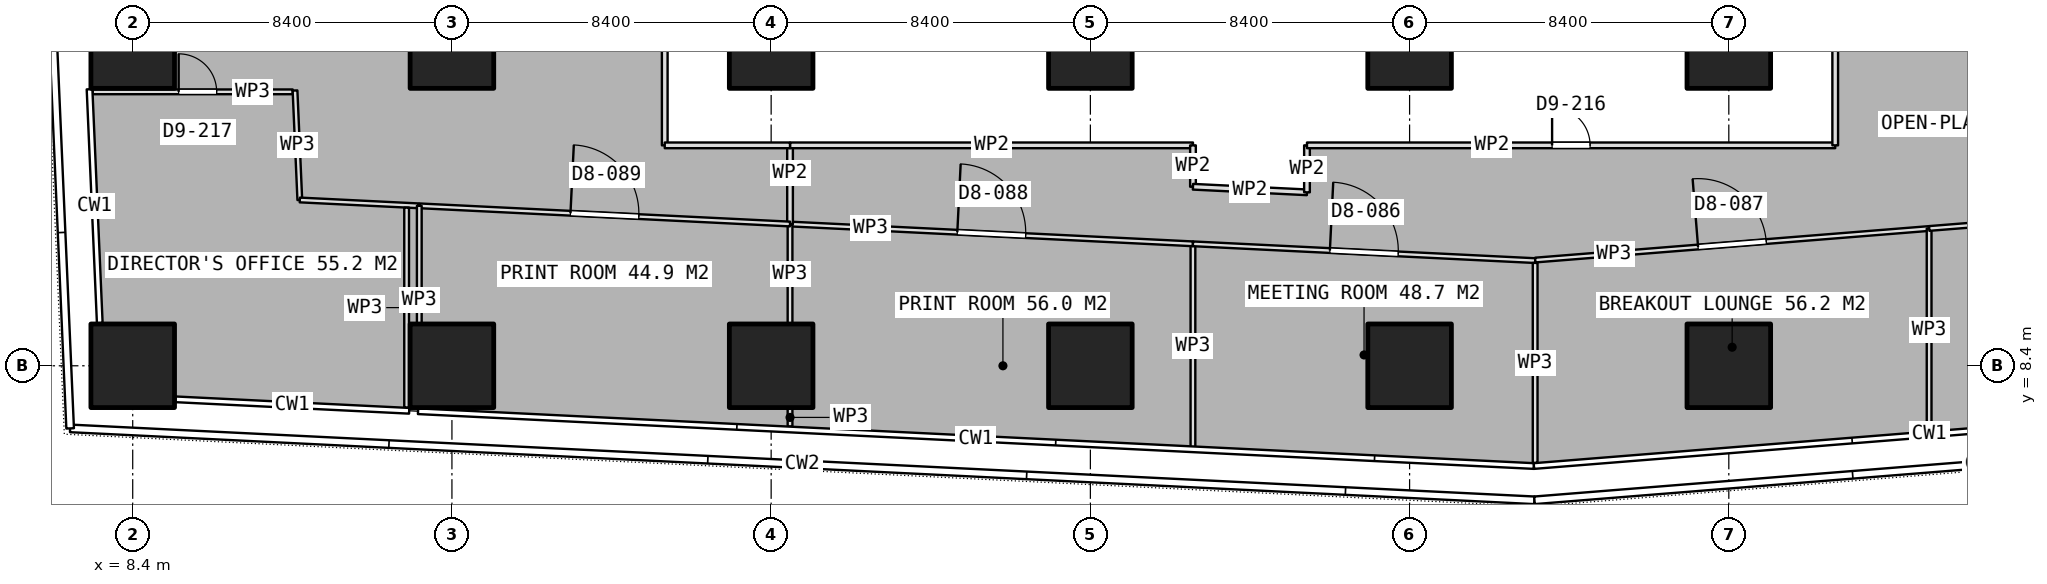
"""IFC4 building model, lengths in metres.
Left out: names, types, materials, properties, quantities, classifications, styles, units other than length and angle.
Written with IfcOpenShell. Run it as: python <this file> out.ifc"""

import sys

from ifc_helpers import new_model, si_unit, direction, frame, frame_2d, origin, origin_2d, place, context, subcontext, project, spatial, rectangle, extrude, element, fill, save


model = new_model("IFC4")
c1 = context("Model", 3, precision=1e-05, world=origin(), true_north=direction((0.0, 1.0)))
c2 = subcontext(c1, "Body", "Model", "MODEL_VIEW")
j1 = project(units=[si_unit("LENGTHUNIT", "METRE"), si_unit("PLANEANGLEUNIT", "RADIAN")], contexts=[c1])
p1 = place(None, origin())
s1 = spatial("IfcSite", under=j1, at=p1, CompositionType="ELEMENT")
p2 = place(p1, origin())
s2 = spatial("IfcBuilding", under=s1, at=p2, CompositionType="ELEMENT")
p3 = place(p2, frame((0.0, 0.0, 66.65)))
s3 = spatial("IfcBuildingStorey", under=s2, at=p3, CompositionType="ELEMENT", Elevation=66.65)
for number, where, z_axis, x_axis in (
    (1, (8.4, 8.4, 0.0), (0.0, 0.0, 1.0), (1.0, 0.0, 0.0)),
    (2, (8.4, 16.8, 0.0), (0.0, 0.0, 1.0), (1.0, 0.0, 0.0)),
    (3, (16.8, 8.4, 0.0), (0.0, 0.0, 1.0), (1.0, 0.0, 0.0)),
    (4, (16.8, 16.8, 0.0), (0.0, 0.0, 1.0), (1.0, 0.0, 0.0)),
    (5, (25.2, 8.4, 0.0), (0.0, 0.0, 1.0), (1.0, 0.0, 0.0)),
    (6, (25.2, 16.8, 0.0), (0.0, 0.0, 1.0), (1.0, 0.0, 0.0)),
    (7, (33.6, 8.4, 0.0), (0.0, 0.0, 1.0), (1.0, 0.0, 0.0)),
    (8, (33.6, 16.8, 0.0), (0.0, 0.0, 1.0), (1.0, 0.0, 0.0)),
    (9, (42.0, 8.4, 0.0), (0.0, 0.0, 1.0), (1.0, 0.0, 0.0)),
    (10, (42.0, 16.8, 0.0), (0.0, 0.0, 1.0), (1.0, 0.0, 0.0)),
    (11, (50.4, 8.4, 0.0), (0.0, 0.0, 1.0), (1.0, 0.0, 0.0)),
    (12, (50.4, 16.8, 0.0), (0.0, 0.0, 1.0), (1.0, 0.0, 0.0)),
):
    element("IfcColumn", number, at=place(p3, frame(where, z_axis=z_axis, x_axis=x_axis)), inside=s3, PredefinedType="COLUMN", context=c2, shape_type="SweptSolid", body=[
        extrude(rectangle(XDim=2.2, YDim=2.2, at=origin_2d()), origin(), (0.0, 0.0, 1.0), 3.75),
    ])
p4 = place(p3, frame((36.299, 6.253, 0.0), z_axis=(0.0, 0.0, 1.0), x_axis=(0.0, 1.0, 0.0)))
e13 = element("IfcWall", 13, at=p4, inside=s3, PredefinedType="PARTITIONING", context=c2, shape_type="SweptSolid", body=[
    extrude(rectangle(XDim=5.356, YDim=0.125, at=frame_2d((2.678, 0.0))), origin(), (0.0, 0.0, 1.0), 3.5),
])
p5 = place(p3, frame((36.299, 11.609, 0.0), z_axis=(0.0, 0.0, 1.0), x_axis=(0.998798622269, -0.049003185143, 0.0)))
e14 = element("IfcWall", 14, at=p5, inside=s3, PredefinedType="PARTITIONING", context=c2, shape_type="SweptSolid", body=[
    extrude(rectangle(XDim=9.018, YDim=0.125, at=frame_2d((4.509, 0.0))), origin(), (0.0, 0.0, 1.0), 3.5),
])
p6 = place(p5, frame((3.608, 0.0, 0.0)))
e15 = element("IfcOpeningElement", 15, at=p6, cuts=e14, PredefinedType="OPENING", context=c2, shape_type="SweptSolid", body=[
    extrude(rectangle(XDim=1.8, YDim=2.1, at=frame_2d((0.9, 1.05))), frame((0.0, 0.073, 0.0), z_axis=(0.0, -1.0, 0.0), x_axis=(1.0, 0.0, 0.0)), (0.0, 0.0, 1.0), 0.145),
])
p7 = place(p3, frame((45.304, 11.107, 0.0), z_axis=(0.0, 0.0, 1.0), x_axis=(0.0, -1.0, 0.0)))
e16 = element("IfcWall", 16, at=p7, inside=s3, PredefinedType="PARTITIONING", context=c2, shape_type="SweptSolid", body=[
    extrude(rectangle(XDim=5.262, YDim=0.125, at=frame_2d((2.631, 0.0))), origin(), (0.0, 0.0, 1.0), 3.5),
])
p8 = place(p3, frame((45.307, 11.182, 0.0), z_axis=(0.0, 0.0, 1.0), x_axis=(0.996807957409, 0.079836683593, 0.0)))
e17 = element("IfcWall", 17, at=p8, inside=s3, PredefinedType="PARTITIONING", context=c2, shape_type="SweptSolid", body=[
    extrude(rectangle(XDim=10.397, YDim=0.125, at=frame_2d((5.199, 0.0))), origin(), (0.0, 0.0, 1.0), 3.5),
])
p9 = place(p8, frame((4.298, 0.0, 0.0)))
e18 = element("IfcOpeningElement", 18, at=p9, cuts=e17, PredefinedType="OPENING", context=c2, shape_type="SweptSolid", body=[
    extrude(rectangle(XDim=1.8, YDim=2.1, at=frame_2d((0.9, 1.05))), frame((0.0, 0.073, 0.0), z_axis=(0.0, -1.0, 0.0), x_axis=(1.0, 0.0, 0.0)), (0.0, 0.0, 1.0), 0.145),
])
p10 = place(p3, frame((55.671, 12.012, 0.0), z_axis=(0.0, 0.0, 1.0), x_axis=(0.0, -1.0, 0.0)))
e19 = element("IfcWall", 19, at=p10, inside=s3, PredefinedType="PARTITIONING", context=c2, shape_type="SweptSolid", body=[
    extrude(rectangle(XDim=5.337, YDim=0.125, at=frame_2d((2.668, 0.0))), origin(), (0.0, 0.0, 1.0), 3.5),
])
p11 = place(p3, frame((55.673, 12.013, 0.0), z_axis=(0.0, 0.0, 1.0), x_axis=(0.996811579084, 0.079791451955, 0.0)))
e20 = element("IfcWall", 20, at=p11, inside=s3, PredefinedType="PARTITIONING", context=c2, shape_type="SweptSolid", body=[
    extrude(rectangle(XDim=7.346, YDim=0.125, at=frame_2d((3.673, 0.0))), origin(), (0.0, 0.0, 1.0), 3.5),
])
p12 = place(p11, frame((3.173, 0.0, 0.0)))
e21 = element("IfcOpeningElement", 21, at=p12, cuts=e20, PredefinedType="OPENING", context=c2, shape_type="SweptSolid", body=[
    extrude(rectangle(XDim=1.0, YDim=2.1, at=frame_2d((0.5, 1.05))), frame((0.0, 0.073, 0.0), z_axis=(0.0, -1.0, 0.0), x_axis=(1.0, 0.0, 0.0)), (0.0, 0.0, 1.0), 0.145),
])
p13 = place(p3, frame((25.697, 12.13, 0.0), z_axis=(0.0, 0.0, 1.0), x_axis=(0.99879453849, -0.049086351277, 0.0)))
e22 = element("IfcWall", 22, at=p13, inside=s3, PredefinedType="PARTITIONING", context=c2, shape_type="SweptSolid", body=[
    extrude(rectangle(XDim=10.614, YDim=0.125, at=frame_2d((5.307, 0.0))), origin(), (0.0, 0.0, 1.0), 3.5),
])
p14 = place(p13, frame((4.407, 0.0, 0.0)))
e23 = element("IfcOpeningElement", 23, at=p14, cuts=e22, PredefinedType="OPENING", context=c2, shape_type="SweptSolid", body=[
    extrude(rectangle(XDim=1.8, YDim=2.1, at=frame_2d((0.9, 1.05))), frame((0.0, 0.073, 0.0), z_axis=(0.0, -1.0, 0.0), x_axis=(1.0, 0.0, 0.0)), (0.0, 0.0, 1.0), 0.145),
])
p15 = place(p3, frame((25.697, 6.803, 0.0), z_axis=(0.0, 0.0, 1.0), x_axis=(0.0, 1.0, 0.0)))
e24 = element("IfcWall", 24, at=p15, inside=s3, PredefinedType="PARTITIONING", context=c2, shape_type="SweptSolid", body=[
    extrude(rectangle(XDim=0.477, YDim=0.125, at=frame_2d((0.239, 0.0))), origin(), (0.0, 0.0, 1.0), 3.5),
])
p16 = place(p3, frame((25.697, 9.52, 0.0), z_axis=(0.0, 0.0, 1.0), x_axis=(0.0, 1.0, 0.0)))
e25 = element("IfcWall", 25, at=p16, inside=s3, PredefinedType="PARTITIONING", context=c2, shape_type="SweptSolid", body=[
    extrude(rectangle(XDim=2.61, YDim=0.125, at=frame_2d((1.305, 0.0))), origin(), (0.0, 0.0, 1.0), 3.5),
])
p17 = place(p3, frame((25.697, 12.13, 0.0), z_axis=(0.0, 0.0, 1.0), x_axis=(0.0, 1.0, 0.0)))
e26 = element("IfcWall", 26, at=p17, inside=s3, PredefinedType="PARTITIONING", context=c2, shape_type="SweptSolid", body=[
    extrude(rectangle(XDim=2.07, YDim=0.15, at=frame_2d((1.035, 0.0))), origin(), (0.0, 0.0, 1.0), 3.5),
])
p18 = place(p3, frame((25.697, 14.2, 0.0), z_axis=(0.0, 0.0, 1.0), x_axis=(1.0, 0.0, 0.0)))
e27 = element("IfcWall", 27, at=p18, inside=s3, PredefinedType="PARTITIONING", context=c2, shape_type="SweptSolid", body=[
    extrude(rectangle(XDim=10.603, YDim=0.15, at=frame_2d((5.302, 0.0))), origin(), (0.0, 0.0, 1.0), 3.5),
])
p19 = place(p3, frame((36.3, 14.2, 0.0), z_axis=(0.0, 0.0, 1.0), x_axis=(0.0, -1.0, 0.0)))
e28 = element("IfcWall", 28, at=p19, inside=s3, PredefinedType="PARTITIONING", context=c2, shape_type="SweptSolid", body=[
    extrude(rectangle(XDim=1.089, YDim=0.15, at=frame_2d((0.544, 0.0))), origin(), (0.0, 0.0, 1.0), 3.5),
])
p20 = place(p3, frame((36.3, 13.111, 0.0), z_axis=(0.0, 0.0, 1.0), x_axis=(0.998802102454, -0.048932199355, 0.0)))
e29 = element("IfcWall", 29, at=p20, inside=s3, PredefinedType="PARTITIONING", context=c2, shape_type="SweptSolid", body=[
    extrude(rectangle(XDim=3.004, YDim=0.15, at=frame_2d((1.502, 0.0))), origin(), (0.0, 0.0, 1.0), 3.5),
])
p21 = place(p3, frame((39.3, 12.964, 0.0), z_axis=(0.0, 0.0, 1.0), x_axis=(0.0, 1.0, 0.0)))
e30 = element("IfcWall", 30, at=p21, inside=s3, PredefinedType="PARTITIONING", context=c2, shape_type="SweptSolid", body=[
    extrude(rectangle(XDim=1.236, YDim=0.15, at=frame_2d((0.618, 0.0))), origin(), (0.0, 0.0, 1.0), 3.5),
])
p22 = place(p3, frame((39.3, 14.2, 0.0), z_axis=(0.0, 0.0, 1.0), x_axis=(1.0, 0.0, 0.0)))
e31 = element("IfcWall", 31, at=p22, inside=s3, PredefinedType="PARTITIONING", context=c2, shape_type="SweptSolid", body=[
    extrude(rectangle(XDim=13.9, YDim=0.15, at=frame_2d((6.95, 0.0))), origin(), (0.0, 0.0, 1.0), 3.5),
])
p23 = place(p22, frame((6.45, 0.0, 0.0)))
e32 = element("IfcOpeningElement", 32, at=p23, cuts=e31, PredefinedType="OPENING", context=c2, shape_type="SweptSolid", body=[
    extrude(rectangle(XDim=1.0, YDim=2.1, at=frame_2d((0.5, 1.05))), frame((0.0, 0.085, 0.0), z_axis=(0.0, -1.0, 0.0), x_axis=(1.0, 0.0, 0.0)), (0.0, 0.0, 1.0), 0.17),
])
p24 = place(p3, frame((53.2, 14.2, 0.0), z_axis=(0.0, 0.0, 1.0), x_axis=(0.0, 1.0, 0.0)))
e33 = element("IfcWall", 33, at=p24, inside=s3, PredefinedType="PARTITIONING", context=c2, shape_type="SweptSolid", body=[
    extrude(rectangle(XDim=11.352, YDim=0.15, at=frame_2d((5.676, 0.0))), origin(), (0.0, 0.0, 1.0), 3.5),
])
p25 = place(p3, frame((7.347, 15.608, 0.0), z_axis=(0.0, 0.0, 1.0), x_axis=(1.0, 0.0, 0.0)))
e34 = element("IfcWall", 34, at=p25, inside=s3, PredefinedType="PARTITIONING", context=c2, shape_type="SweptSolid", body=[
    extrude(rectangle(XDim=5.263, YDim=0.125, at=frame_2d((2.632, 0.0))), origin(), (0.0, 0.0, 1.0), 3.5),
])
p26 = place(p25, frame((2.262, 0.0, 0.0)))
e35 = element("IfcOpeningElement", 35, at=p26, cuts=e34, PredefinedType="OPENING", context=c2, shape_type="SweptSolid", body=[
    extrude(rectangle(XDim=1.0, YDim=2.1, at=frame_2d((0.5, 1.05))), frame((0.0, 0.073, 0.0), z_axis=(0.0, -1.0, 0.0), x_axis=(1.0, 0.0, 0.0)), (0.0, 0.0, 1.0), 0.145),
])
p27 = place(p3, frame((12.671, 15.643, 0.0), z_axis=(0.0, 0.0, 1.0), x_axis=(0.043782676762, -0.999041078843, 0.0)))
e36 = element("IfcWall", 36, at=p27, inside=s3, PredefinedType="PARTITIONING", context=c2, shape_type="SweptSolid", body=[
    extrude(rectangle(XDim=2.883, YDim=0.125, at=frame_2d((1.441, 0.0))), origin(), (0.0, 0.0, 1.0), 3.5),
])
p28 = place(p3, frame((12.797, 12.763, 0.0), z_axis=(0.0, 0.0, 1.0), x_axis=(0.998790140287, -0.049175762993, 0.0)))
e37 = element("IfcWall", 37, at=p28, inside=s3, PredefinedType="PARTITIONING", context=c2, shape_type="SweptSolid", body=[
    extrude(rectangle(XDim=3.133, YDim=0.125, at=frame_2d((1.566, 0.0))), origin(), (0.0, 0.0, 1.0), 3.5),
])
p29 = place(p3, frame((15.608, 12.562, 0.0), z_axis=(0.0, 0.0, 1.0), x_axis=(0.0, -1.0, 0.0)))
e38 = element("IfcWall", 38, at=p29, inside=s3, PredefinedType="PARTITIONING", context=c2, shape_type="SweptSolid", body=[
    extrude(rectangle(XDim=5.263, YDim=0.125, at=frame_2d((2.631, 0.0))), origin(), (0.0, 0.0, 1.0), 3.5),
])
p30 = place(p3, frame((15.941, 12.609, 0.0), z_axis=(0.0, 0.0, 1.0), x_axis=(0.998796633854, -0.049043696865, 0.0)))
e39 = element("IfcWall", 39, at=p30, inside=s3, PredefinedType="PARTITIONING", context=c2, shape_type="SweptSolid", body=[
    extrude(rectangle(XDim=9.767, YDim=0.125, at=frame_2d((4.883, 0.0))), origin(), (0.0, 0.0, 1.0), 3.5),
])
p31 = place(p30, frame((3.983, 0.0, 0.0)))
e40 = element("IfcOpeningElement", 40, at=p31, cuts=e39, PredefinedType="OPENING", context=c2, shape_type="SweptSolid", body=[
    extrude(rectangle(XDim=1.8, YDim=2.1, at=frame_2d((0.9, 1.05))), frame((0.0, 0.073, 0.0), z_axis=(0.0, -1.0, 0.0), x_axis=(1.0, 0.0, 0.0)), (0.0, 0.0, 1.0), 0.145),
])
p32 = place(p3, frame((15.941, 9.52, 0.0), z_axis=(0.0, 0.0, 1.0), x_axis=(0.0, 1.0, 0.0)))
e41 = element("IfcWall", 41, at=p32, inside=s3, PredefinedType="PARTITIONING", context=c2, shape_type="SweptSolid", body=[
    extrude(rectangle(XDim=3.089, YDim=0.125, at=frame_2d((1.544, 0.0))), origin(), (0.0, 0.0, 1.0), 3.5),
])
p33 = place(p3, frame((22.4, 28.2, 0.0), z_axis=(0.0, 0.0, 1.0), x_axis=(0.0, -1.0, 0.0)))
e42 = element("IfcWall", 42, at=p33, inside=s3, PredefinedType="PARTITIONING", context=c2, shape_type="SweptSolid", body=[
    extrude(rectangle(XDim=14.0, YDim=0.15, at=frame_2d((7.0, 0.0))), origin(), (0.0, 0.0, 1.0), 3.5),
])
p34 = place(p3, frame((22.4, 14.2, 0.0), z_axis=(0.0, 0.0, 1.0), x_axis=(1.0, 0.0, 0.0)))
e43 = element("IfcWall", 43, at=p34, inside=s3, PredefinedType="PARTITIONING", context=c2, shape_type="SweptSolid", body=[
    extrude(rectangle(XDim=3.296, YDim=0.15, at=frame_2d((1.648, 0.0))), origin(), (0.0, 0.0, 1.0), 3.5),
])
p35 = place(p6, origin())
e44 = element("IfcDoor", 44, at=p35, inside=s3, OperationType="DOUBLE_DOOR_SINGLE_SWING", PredefinedType="DOOR", context=c2, shape_type="SweptSolid", body=[
    extrude(rectangle(XDim=1.8, YDim=2.1, at=frame_2d((0.9, 1.05))), frame((0.0, 0.025, 0.0), z_axis=(0.0, -1.0, 0.0), x_axis=(1.0, 0.0, 0.0)), (0.0, 0.0, 1.0), 0.05),
])
fill(e15, e44)
p36 = place(p9, origin())
e45 = element("IfcDoor", 45, at=p36, inside=s3, OperationType="DOUBLE_DOOR_SINGLE_SWING", PredefinedType="DOOR", context=c2, shape_type="SweptSolid", body=[
    extrude(rectangle(XDim=1.8, YDim=2.1, at=frame_2d((0.9, 1.05))), frame((0.0, 0.025, 0.0), z_axis=(0.0, -1.0, 0.0), x_axis=(1.0, 0.0, 0.0)), (0.0, 0.0, 1.0), 0.05),
])
fill(e18, e45)
p37 = place(p14, origin())
e46 = element("IfcDoor", 46, at=p37, inside=s3, OperationType="DOUBLE_DOOR_SINGLE_SWING", PredefinedType="DOOR", context=c2, shape_type="SweptSolid", body=[
    extrude(rectangle(XDim=1.8, YDim=2.1, at=frame_2d((0.9, 1.05))), frame((0.0, 0.025, 0.0), z_axis=(0.0, -1.0, 0.0), x_axis=(1.0, 0.0, 0.0)), (0.0, 0.0, 1.0), 0.05),
])
fill(e23, e46)
p38 = place(p23, origin())
e47 = element("IfcDoor", 47, at=p38, inside=s3, OperationType="SINGLE_SWING_LEFT", PredefinedType="DOOR", context=c2, shape_type="SweptSolid", body=[
    extrude(rectangle(XDim=1.0, YDim=2.1, at=frame_2d((0.5, 1.05))), frame((0.0, 0.025, 0.0), z_axis=(0.0, -1.0, 0.0), x_axis=(1.0, 0.0, 0.0)), (0.0, 0.0, 1.0), 0.05),
])
fill(e32, e47)
p39 = place(p26, origin())
e48 = element("IfcDoor", 48, at=p39, inside=s3, OperationType="SINGLE_SWING_LEFT", PredefinedType="DOOR", context=c2, shape_type="SweptSolid", body=[
    extrude(rectangle(XDim=1.0, YDim=2.1, at=frame_2d((0.5, 1.05))), frame((0.0, 0.025, 0.0), z_axis=(0.0, -1.0, 0.0), x_axis=(1.0, 0.0, 0.0)), (0.0, 0.0, 1.0), 0.05),
])
fill(e35, e48)
p40 = place(p31, origin())
e49 = element("IfcDoor", 49, at=p40, inside=s3, OperationType="DOUBLE_DOOR_SINGLE_SWING", PredefinedType="DOOR", context=c2, shape_type="SweptSolid", body=[
    extrude(rectangle(XDim=1.8, YDim=2.1, at=frame_2d((0.9, 1.05))), frame((0.0, 0.025, 0.0), z_axis=(0.0, -1.0, 0.0), x_axis=(1.0, 0.0, 0.0)), (0.0, 0.0, 1.0), 0.05),
])
fill(e40, e49)
save(model, sys.argv[1])
